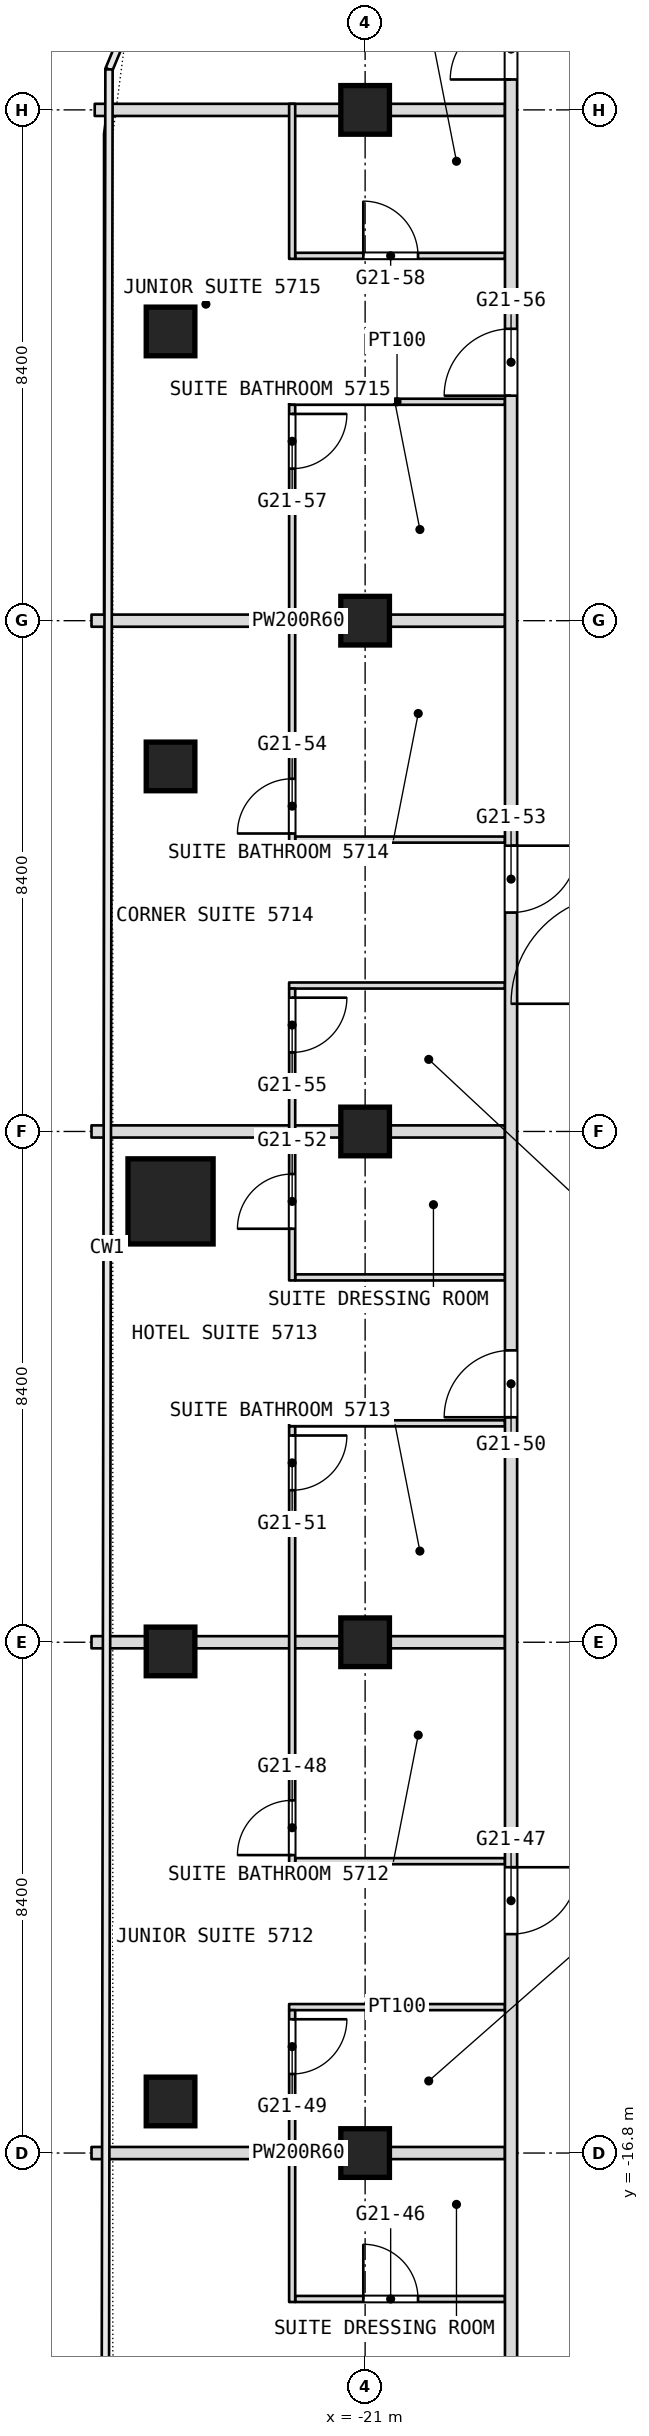
"""IFC4 building model, lengths in metres.
Left out: names, types, materials, properties, quantities, classifications, styles, units other than length and angle.
Written with IfcOpenShell. Run it as: python <this file> out.ifc"""

import sys

from ifc_helpers import new_model, si_unit, direction, frame, frame_2d, origin, origin_2d, place, context, subcontext, project, spatial, rectangle, extrude, element, fill, save


model = new_model("IFC4")
c1 = context("Model", 3, precision=1e-05, world=origin(), true_north=direction((0.0, 1.0)))
c2 = subcontext(c1, "Body", "Model", "MODEL_VIEW")
j1 = project(units=[si_unit("LENGTHUNIT", "METRE"), si_unit("PLANEANGLEUNIT", "RADIAN")], contexts=[c1])
p1 = place(None, origin())
s1 = spatial("IfcSite", under=j1, at=p1, CompositionType="ELEMENT")
p2 = place(p1, origin())
s2 = spatial("IfcBuilding", under=s1, at=p2, CompositionType="ELEMENT")
p3 = place(p2, frame((0.0, 0.0, 241.7)))
s3 = spatial("IfcBuildingStorey", under=s2, at=p3, CompositionType="ELEMENT", Elevation=241.7)
p4 = place(p3, frame((-24.2, -1.15, 0.0), z_axis=(0.0, 0.0, 1.0), x_axis=(1.0, 0.0, 0.0)))
e1 = element("IfcColumn", 1, at=p4, inside=s3, PredefinedType="COLUMN", context=c2, shape_type="SweptSolid", body=[
    extrude(rectangle(XDim=1.4, YDim=1.4, at=origin_2d()), origin(), (0.0, 0.0, 1.0), 3.6),
])
for number, where, z_axis, x_axis in (
    (2, (-21.0, -16.8, 0.0), (0.0, 0.0, 1.0), (1.0, 0.0, 0.0)),
    (3, (-21.0, -8.4, 0.0), (0.0, 0.0, 1.0), (1.0, 0.0, 0.0)),
    (4, (-21.0, 0.0, 0.0), (0.0, 0.0, 1.0), (1.0, 0.0, 0.0)),
    (5, (-21.0, 8.4, 0.0), (0.0, 0.0, 1.0), (1.0, 0.0, 0.0)),
    (6, (-21.0, 16.8, 0.0), (0.0, 0.0, 1.0), (1.0, 0.0, 0.0)),
    (7, (-24.2, -15.952, 0.0), (0.0, 0.0, 1.0), (1.0, 0.0, 0.0)),
    (8, (-24.2, -8.551, 0.0), (0.0, 0.0, 1.0), (1.0, 0.0, 0.0)),
    (9, (-24.2, 6.003, 0.0), (0.0, 0.0, 1.0), (1.0, 0.0, 0.0)),
    (10, (-24.2, 13.156, 0.0), (0.0, 0.0, 1.0), (1.0, 0.0, 0.0)),
):
    element("IfcColumn", number, at=place(p3, frame(where, z_axis=z_axis, x_axis=x_axis)), inside=s3, PredefinedType="COLUMN", context=c2, shape_type="SweptSolid", body=[
        extrude(rectangle(XDim=0.8, YDim=0.8, at=origin_2d()), origin(), (0.0, 0.0, 1.0), 3.6),
    ])
p5 = place(p3, frame((-22.15, -19.2, 0.0), z_axis=(0.0, 0.0, 1.0), x_axis=(1.0, 0.0, 0.0)))
e11 = element("IfcWall", 11, at=p5, inside=s3, PredefinedType="PARTITIONING", context=c2, shape_type="SweptSolid", body=[
    extrude(rectangle(XDim=3.45, YDim=0.1, at=frame_2d((1.725, 0.0))), origin(), (0.0, 0.0, 1.0), 3.34),
])
p6 = place(p5, frame((1.12, 0.0, 0.0)))
e12 = element("IfcOpeningElement", 12, at=p6, cuts=e11, PredefinedType="OPENING", context=c2, shape_type="SweptSolid", body=[
    extrude(rectangle(XDim=0.9, YDim=2.1, at=frame_2d((0.45, 1.05))), frame((0.0, 0.05, 0.0), z_axis=(0.0, -1.0, 0.0), x_axis=(1.0, 0.0, 0.0)), (0.0, 0.0, 1.0), 0.1),
])
p7 = place(p3, frame((-25.5, -16.8, 0.0), z_axis=(0.0, 0.0, 1.0), x_axis=(1.0, 0.0, 0.0)))
e13 = element("IfcWall", 13, at=p7, inside=s3, PredefinedType="PARTITIONING", context=c2, shape_type="SweptSolid", body=[
    extrude(rectangle(XDim=6.8, YDim=0.2, at=frame_2d((3.4, 0.0))), origin(), (0.0, 0.0, 1.0), 2.94),
])
p8 = place(p3, frame((-22.25, -14.4, 0.0), z_axis=(0.0, 0.0, 1.0), x_axis=(1.0, 0.0, 0.0)))
e14 = element("IfcWall", 14, at=p8, inside=s3, PredefinedType="PARTITIONING", context=c2, shape_type="SweptSolid", body=[
    extrude(rectangle(XDim=3.55, YDim=0.1, at=frame_2d((1.775, 0.0))), origin(), (0.0, 0.0, 1.0), 3.34),
])
p9 = place(p3, frame((-22.15, -12.0, 0.0), z_axis=(0.0, 0.0, 1.0), x_axis=(1.0, 0.0, 0.0)))
e15 = element("IfcWall", 15, at=p9, inside=s3, PredefinedType="PARTITIONING", context=c2, shape_type="SweptSolid", body=[
    extrude(rectangle(XDim=3.45, YDim=0.1, at=frame_2d((1.725, 0.0))), origin(), (0.0, 0.0, 1.0), 3.34),
])
p10 = place(p3, frame((-25.5, -8.4, 0.0), z_axis=(0.0, 0.0, 1.0), x_axis=(1.0, 0.0, 0.0)))
e16 = element("IfcWall", 16, at=p10, inside=s3, PredefinedType="PARTITIONING", context=c2, shape_type="SweptSolid", body=[
    extrude(rectangle(XDim=6.8, YDim=0.2, at=frame_2d((3.4, 0.0))), origin(), (0.0, 0.0, 1.0), 2.94),
])
p11 = place(p3, frame((-22.25, -4.8, 0.0), z_axis=(0.0, 0.0, 1.0), x_axis=(1.0, 0.0, 0.0)))
e17 = element("IfcWall", 17, at=p11, inside=s3, PredefinedType="PARTITIONING", context=c2, shape_type="SweptSolid", body=[
    extrude(rectangle(XDim=3.55, YDim=0.1, at=frame_2d((1.775, 0.0))), origin(), (0.0, 0.0, 1.0), 3.34),
])
p12 = place(p3, frame((-22.15, -2.4, 0.0), z_axis=(0.0, 0.0, 1.0), x_axis=(1.0, 0.0, 0.0)))
e18 = element("IfcWall", 18, at=p12, inside=s3, PredefinedType="PARTITIONING", context=c2, shape_type="SweptSolid", body=[
    extrude(rectangle(XDim=3.45, YDim=0.1, at=frame_2d((1.725, 0.0))), origin(), (0.0, 0.0, 1.0), 3.34),
])
p13 = place(p3, frame((-25.5, 0.0, 0.0), z_axis=(0.0, 0.0, 1.0), x_axis=(1.0, 0.0, 0.0)))
e19 = element("IfcWall", 19, at=p13, inside=s3, PredefinedType="PARTITIONING", context=c2, shape_type="SweptSolid", body=[
    extrude(rectangle(XDim=6.8, YDim=0.2, at=frame_2d((3.4, 0.0))), origin(), (0.0, 0.0, 1.0), 2.94),
])
p14 = place(p3, frame((-22.25, 2.4, 0.0), z_axis=(0.0, 0.0, 1.0), x_axis=(1.0, 0.0, 0.0)))
e20 = element("IfcWall", 20, at=p14, inside=s3, PredefinedType="PARTITIONING", context=c2, shape_type="SweptSolid", body=[
    extrude(rectangle(XDim=3.55, YDim=0.1, at=frame_2d((1.775, 0.0))), origin(), (0.0, 0.0, 1.0), 3.34),
])
p15 = place(p3, frame((-22.15, 4.8, 0.0), z_axis=(0.0, 0.0, 1.0), x_axis=(1.0, 0.0, 0.0)))
e21 = element("IfcWall", 21, at=p15, inside=s3, PredefinedType="PARTITIONING", context=c2, shape_type="SweptSolid", body=[
    extrude(rectangle(XDim=3.45, YDim=0.1, at=frame_2d((1.725, 0.0))), origin(), (0.0, 0.0, 1.0), 3.34),
])
p16 = place(p3, frame((-25.5, 8.4, 0.0), z_axis=(0.0, 0.0, 1.0), x_axis=(1.0, 0.0, 0.0)))
e22 = element("IfcWall", 22, at=p16, inside=s3, PredefinedType="PARTITIONING", context=c2, shape_type="SweptSolid", body=[
    extrude(rectangle(XDim=6.8, YDim=0.2, at=frame_2d((3.4, 0.0))), origin(), (0.0, 0.0, 1.0), 2.94),
])
p17 = place(p3, frame((-22.25, 12.0, 0.0), z_axis=(0.0, 0.0, 1.0), x_axis=(1.0, 0.0, 0.0)))
e23 = element("IfcWall", 23, at=p17, inside=s3, PredefinedType="PARTITIONING", context=c2, shape_type="SweptSolid", body=[
    extrude(rectangle(XDim=3.55, YDim=0.1, at=frame_2d((1.775, 0.0))), origin(), (0.0, 0.0, 1.0), 3.34),
])
p18 = place(p3, frame((-22.15, 14.4, 0.0), z_axis=(0.0, 0.0, 1.0), x_axis=(1.0, 0.0, 0.0)))
e24 = element("IfcWall", 24, at=p18, inside=s3, PredefinedType="PARTITIONING", context=c2, shape_type="SweptSolid", body=[
    extrude(rectangle(XDim=3.45, YDim=0.1, at=frame_2d((1.725, 0.0))), origin(), (0.0, 0.0, 1.0), 3.34),
])
p19 = place(p18, frame((1.12, 0.0, 0.0)))
e25 = element("IfcOpeningElement", 25, at=p19, cuts=e24, PredefinedType="OPENING", context=c2, shape_type="SweptSolid", body=[
    extrude(rectangle(XDim=0.9, YDim=2.1, at=frame_2d((0.45, 1.05))), frame((0.0, 0.05, 0.0), z_axis=(0.0, -1.0, 0.0), x_axis=(1.0, 0.0, 0.0)), (0.0, 0.0, 1.0), 0.1),
])
p20 = place(p3, frame((-25.447, 16.8, 0.0), z_axis=(0.0, 0.0, 1.0), x_axis=(1.0, 0.0, 0.0)))
e26 = element("IfcWall", 26, at=p20, inside=s3, PredefinedType="PARTITIONING", context=c2, shape_type="SweptSolid", body=[
    extrude(rectangle(XDim=6.747, YDim=0.2, at=frame_2d((3.374, 0.0))), origin(), (0.0, 0.0, 1.0), 2.94),
])
p21 = place(p3, frame((-18.6, -26.751, 0.0), z_axis=(0.0, 0.0, 1.0), x_axis=(0.0, 1.0, 0.0)))
e27 = element("IfcWall", 27, at=p21, inside=s3, PredefinedType="PARTITIONING", context=c2, shape_type="SweptSolid", body=[
    extrude(rectangle(XDim=49.091, YDim=0.2, at=frame_2d((24.545, 0.0))), origin(), (0.0, 0.0, 1.0), 3.34),
])
p22 = place(p21, frame((4.576, 0.0, 0.0)))
e28 = element("IfcOpeningElement", 28, at=p22, cuts=e27, PredefinedType="OPENING", context=c2, shape_type="SweptSolid", body=[
    extrude(rectangle(XDim=1.1, YDim=2.1, at=frame_2d((0.55, 1.05))), frame((0.0, 0.1, 0.0), z_axis=(0.0, -1.0, 0.0), x_axis=(1.0, 0.0, 0.0)), (0.0, 0.0, 1.0), 0.2),
])
p23 = place(p21, frame((13.551, 0.0, 0.0)))
e29 = element("IfcOpeningElement", 29, at=p23, cuts=e27, PredefinedType="OPENING", context=c2, shape_type="SweptSolid", body=[
    extrude(rectangle(XDim=1.1, YDim=2.1, at=frame_2d((0.55, 1.05))), frame((0.0, 0.1, 0.0), z_axis=(0.0, -1.0, 0.0), x_axis=(1.0, 0.0, 0.0)), (0.0, 0.0, 1.0), 0.2),
])
p24 = place(p21, frame((22.051, 0.0, 0.0)))
e30 = element("IfcOpeningElement", 30, at=p24, cuts=e27, PredefinedType="OPENING", context=c2, shape_type="SweptSolid", body=[
    extrude(rectangle(XDim=1.1, YDim=2.1, at=frame_2d((0.55, 1.05))), frame((0.0, 0.1, 0.0), z_axis=(0.0, -1.0, 0.0), x_axis=(1.0, 0.0, 0.0)), (0.0, 0.0, 1.0), 0.2),
])
p25 = place(p21, frame((30.351, 0.0, 0.0)))
e31 = element("IfcOpeningElement", 31, at=p25, cuts=e27, PredefinedType="OPENING", context=c2, shape_type="SweptSolid", body=[
    extrude(rectangle(XDim=1.1, YDim=2.1, at=frame_2d((0.55, 1.05))), frame((0.0, 0.1, 0.0), z_axis=(0.0, -1.0, 0.0), x_axis=(1.0, 0.0, 0.0)), (0.0, 0.0, 1.0), 0.2),
])
p26 = place(p21, frame((38.851, 0.0, 0.0)))
e32 = element("IfcOpeningElement", 32, at=p26, cuts=e27, PredefinedType="OPENING", context=c2, shape_type="SweptSolid", body=[
    extrude(rectangle(XDim=1.1, YDim=2.1, at=frame_2d((0.55, 1.05))), frame((0.0, 0.1, 0.0), z_axis=(0.0, -1.0, 0.0), x_axis=(1.0, 0.0, 0.0)), (0.0, 0.0, 1.0), 0.2),
])
p27 = place(p21, frame((44.051, 0.0, 0.0)))
e33 = element("IfcOpeningElement", 33, at=p27, cuts=e27, PredefinedType="OPENING", context=c2, shape_type="SweptSolid", body=[
    extrude(rectangle(XDim=1.0, YDim=2.1, at=frame_2d((0.5, 1.05))), frame((0.0, 0.1, 0.0), z_axis=(0.0, -1.0, 0.0), x_axis=(1.0, 0.0, 0.0)), (0.0, 0.0, 1.0), 0.2),
])
p28 = place(p3, frame((-22.2, -19.25, 0.0), z_axis=(0.0, 0.0, 1.0), x_axis=(0.0, 1.0, 0.0)))
e34 = element("IfcWall", 34, at=p28, inside=s3, PredefinedType="PARTITIONING", context=c2, shape_type="SweptSolid", body=[
    extrude(rectangle(XDim=4.8, YDim=0.1, at=frame_2d((2.4, 0.0))), origin(), (0.0, 0.0, 1.0), 3.34),
])
p29 = place(p28, frame((3.75, 0.0, 0.0)))
e35 = element("IfcOpeningElement", 35, at=p29, cuts=e34, PredefinedType="OPENING", context=c2, shape_type="SweptSolid", body=[
    extrude(rectangle(XDim=0.9, YDim=2.1, at=frame_2d((0.45, 1.05))), frame((0.0, 0.05, 0.0), z_axis=(0.0, -1.0, 0.0), x_axis=(1.0, 0.0, 0.0)), (0.0, 0.0, 1.0), 0.1),
])
p30 = place(p3, frame((-22.2, -12.05, 0.0), z_axis=(0.0, 0.0, 1.0), x_axis=(0.0, 1.0, 0.0)))
e36 = element("IfcWall", 36, at=p30, inside=s3, PredefinedType="PARTITIONING", context=c2, shape_type="SweptSolid", body=[
    extrude(rectangle(XDim=7.2, YDim=0.1, at=frame_2d((3.6, 0.0))), origin(), (0.0, 0.0, 1.0), 3.34),
])
p31 = place(p30, frame((0.15, 0.0, 0.0)))
e37 = element("IfcOpeningElement", 37, at=p31, cuts=e36, PredefinedType="OPENING", context=c2, shape_type="SweptSolid", body=[
    extrude(rectangle(XDim=0.9, YDim=2.1, at=frame_2d((0.45, 1.05))), frame((0.0, 0.05, 0.0), z_axis=(0.0, -1.0, 0.0), x_axis=(1.0, 0.0, 0.0)), (0.0, 0.0, 1.0), 0.1),
])
p32 = place(p30, frame((6.15, 0.0, 0.0)))
e38 = element("IfcOpeningElement", 38, at=p32, cuts=e36, PredefinedType="OPENING", context=c2, shape_type="SweptSolid", body=[
    extrude(rectangle(XDim=0.9, YDim=2.1, at=frame_2d((0.45, 1.05))), frame((0.0, 0.05, 0.0), z_axis=(0.0, -1.0, 0.0), x_axis=(1.0, 0.0, 0.0)), (0.0, 0.0, 1.0), 0.1),
])
p33 = place(p3, frame((-22.2, -2.45, 0.0), z_axis=(0.0, 0.0, 1.0), x_axis=(0.0, 1.0, 0.0)))
e39 = element("IfcWall", 39, at=p33, inside=s3, PredefinedType="PARTITIONING", context=c2, shape_type="SweptSolid", body=[
    extrude(rectangle(XDim=4.8, YDim=0.1, at=frame_2d((2.4, 0.0))), origin(), (0.0, 0.0, 1.0), 3.34),
])
p34 = place(p33, frame((0.85, 0.0, 0.0)))
e40 = element("IfcOpeningElement", 40, at=p34, cuts=e39, PredefinedType="OPENING", context=c2, shape_type="SweptSolid", body=[
    extrude(rectangle(XDim=0.9, YDim=2.1, at=frame_2d((0.45, 1.05))), frame((0.0, 0.05, 0.0), z_axis=(0.0, -1.0, 0.0), x_axis=(1.0, 0.0, 0.0)), (0.0, 0.0, 1.0), 0.1),
])
p35 = place(p33, frame((3.75, 0.0, 0.0)))
e41 = element("IfcOpeningElement", 41, at=p35, cuts=e39, PredefinedType="OPENING", context=c2, shape_type="SweptSolid", body=[
    extrude(rectangle(XDim=0.9, YDim=2.1, at=frame_2d((0.45, 1.05))), frame((0.0, 0.05, 0.0), z_axis=(0.0, -1.0, 0.0), x_axis=(1.0, 0.0, 0.0)), (0.0, 0.0, 1.0), 0.1),
])
p36 = place(p3, frame((-22.2, 4.75, 0.0), z_axis=(0.0, 0.0, 1.0), x_axis=(0.0, 1.0, 0.0)))
e42 = element("IfcWall", 42, at=p36, inside=s3, PredefinedType="PARTITIONING", context=c2, shape_type="SweptSolid", body=[
    extrude(rectangle(XDim=7.2, YDim=0.1, at=frame_2d((3.6, 0.0))), origin(), (0.0, 0.0, 1.0), 3.34),
])
p37 = place(p36, frame((0.15, 0.0, 0.0)))
e43 = element("IfcOpeningElement", 43, at=p37, cuts=e42, PredefinedType="OPENING", context=c2, shape_type="SweptSolid", body=[
    extrude(rectangle(XDim=0.9, YDim=2.1, at=frame_2d((0.45, 1.05))), frame((0.0, 0.05, 0.0), z_axis=(0.0, -1.0, 0.0), x_axis=(1.0, 0.0, 0.0)), (0.0, 0.0, 1.0), 0.1),
])
p38 = place(p36, frame((6.15, 0.0, 0.0)))
e44 = element("IfcOpeningElement", 44, at=p38, cuts=e42, PredefinedType="OPENING", context=c2, shape_type="SweptSolid", body=[
    extrude(rectangle(XDim=0.9, YDim=2.1, at=frame_2d((0.45, 1.05))), frame((0.0, 0.05, 0.0), z_axis=(0.0, -1.0, 0.0), x_axis=(1.0, 0.0, 0.0)), (0.0, 0.0, 1.0), 0.1),
])
p39 = place(p3, frame((-22.2, 14.35, 0.0), z_axis=(0.0, 0.0, 1.0), x_axis=(0.0, 1.0, 0.0)))
e45 = element("IfcWall", 45, at=p39, inside=s3, PredefinedType="PARTITIONING", context=c2, shape_type="SweptSolid", body=[
    extrude(rectangle(XDim=2.55, YDim=0.1, at=frame_2d((1.275, 0.0))), origin(), (0.0, 0.0, 1.0), 3.34),
])
p40 = place(p6, origin())
e46 = element("IfcDoor", 46, at=p40, inside=s3, OperationType="SINGLE_SWING_LEFT", PredefinedType="DOOR", context=c2, shape_type="SweptSolid", body=[
    extrude(rectangle(XDim=0.9, YDim=2.1, at=frame_2d((0.45, 1.05))), frame((0.0, 0.025, 0.0), z_axis=(0.0, -1.0, 0.0), x_axis=(1.0, 0.0, 0.0)), (0.0, 0.0, 1.0), 0.05),
])
fill(e12, e46)
p41 = place(p19, origin())
e47 = element("IfcDoor", 47, at=p41, inside=s3, OperationType="SINGLE_SWING_LEFT", PredefinedType="DOOR", context=c2, shape_type="SweptSolid", body=[
    extrude(rectangle(XDim=0.9, YDim=2.1, at=frame_2d((0.45, 1.05))), frame((0.0, 0.025, 0.0), z_axis=(0.0, -1.0, 0.0), x_axis=(1.0, 0.0, 0.0)), (0.0, 0.0, 1.0), 0.05),
])
fill(e25, e47)
p42 = place(p23, origin())
e48 = element("IfcDoor", 48, at=p42, inside=s3, OperationType="SINGLE_SWING_RIGHT", PredefinedType="DOOR", context=c2, shape_type="SweptSolid", body=[
    extrude(rectangle(XDim=1.1, YDim=2.1, at=frame_2d((0.55, 1.05))), frame((0.0, 0.025, 0.0), z_axis=(0.0, -1.0, 0.0), x_axis=(1.0, 0.0, 0.0)), (0.0, 0.0, 1.0), 0.05),
])
fill(e29, e48)
p43 = place(p24, origin())
e49 = element("IfcDoor", 49, at=p43, inside=s3, OperationType="SINGLE_SWING_LEFT", PredefinedType="DOOR", context=c2, shape_type="SweptSolid", body=[
    extrude(rectangle(XDim=1.1, YDim=2.1, at=frame_2d((0.55, 1.05))), frame((0.0, 0.025, 0.0), z_axis=(0.0, -1.0, 0.0), x_axis=(1.0, 0.0, 0.0)), (0.0, 0.0, 1.0), 0.05),
])
fill(e30, e49)
p44 = place(p25, origin())
e50 = element("IfcDoor", 50, at=p44, inside=s3, OperationType="SINGLE_SWING_RIGHT", PredefinedType="DOOR", context=c2, shape_type="SweptSolid", body=[
    extrude(rectangle(XDim=1.1, YDim=2.1, at=frame_2d((0.55, 1.05))), frame((0.0, 0.025, 0.0), z_axis=(0.0, -1.0, 0.0), x_axis=(1.0, 0.0, 0.0)), (0.0, 0.0, 1.0), 0.05),
])
fill(e31, e50)
p45 = place(p26, origin())
e51 = element("IfcDoor", 51, at=p45, inside=s3, OperationType="SINGLE_SWING_LEFT", PredefinedType="DOOR", context=c2, shape_type="SweptSolid", body=[
    extrude(rectangle(XDim=1.1, YDim=2.1, at=frame_2d((0.55, 1.05))), frame((0.0, 0.025, 0.0), z_axis=(0.0, -1.0, 0.0), x_axis=(1.0, 0.0, 0.0)), (0.0, 0.0, 1.0), 0.05),
])
fill(e32, e51)
p46 = place(p27, origin())
e52 = element("IfcDoor", 52, at=p46, inside=s3, OperationType="SINGLE_SWING_RIGHT", PredefinedType="DOOR", context=c2, shape_type="SweptSolid", body=[
    extrude(rectangle(XDim=1.0, YDim=2.1, at=frame_2d((0.5, 1.05))), frame((0.0, 0.025, 0.0), z_axis=(0.0, -1.0, 0.0), x_axis=(1.0, 0.0, 0.0)), (0.0, 0.0, 1.0), 0.05),
])
fill(e33, e52)
p47 = place(p29, origin())
e53 = element("IfcDoor", 53, at=p47, inside=s3, OperationType="SINGLE_SWING_LEFT", PredefinedType="DOOR", context=c2, shape_type="SweptSolid", body=[
    extrude(rectangle(XDim=0.9, YDim=2.1, at=frame_2d((0.45, 1.05))), frame((0.0, 0.025, 0.0), z_axis=(0.0, -1.0, 0.0), x_axis=(1.0, 0.0, 0.0)), (0.0, 0.0, 1.0), 0.05),
])
fill(e35, e53)
p48 = place(p31, origin())
e54 = element("IfcDoor", 54, at=p48, inside=s3, OperationType="SINGLE_SWING_RIGHT", PredefinedType="DOOR", context=c2, shape_type="SweptSolid", body=[
    extrude(rectangle(XDim=0.9, YDim=2.1, at=frame_2d((0.45, 1.05))), frame((0.0, 0.025, 0.0), z_axis=(0.0, -1.0, 0.0), x_axis=(1.0, 0.0, 0.0)), (0.0, 0.0, 1.0), 0.05),
])
fill(e37, e54)
p49 = place(p32, origin())
e55 = element("IfcDoor", 55, at=p49, inside=s3, OperationType="SINGLE_SWING_LEFT", PredefinedType="DOOR", context=c2, shape_type="SweptSolid", body=[
    extrude(rectangle(XDim=0.9, YDim=2.1, at=frame_2d((0.45, 1.05))), frame((0.0, 0.025, 0.0), z_axis=(0.0, -1.0, 0.0), x_axis=(1.0, 0.0, 0.0)), (0.0, 0.0, 1.0), 0.05),
])
fill(e38, e55)
p50 = place(p34, origin())
e56 = element("IfcDoor", 56, at=p50, inside=s3, OperationType="SINGLE_SWING_LEFT", PredefinedType="DOOR", context=c2, shape_type="SweptSolid", body=[
    extrude(rectangle(XDim=0.9, YDim=2.1, at=frame_2d((0.45, 1.05))), frame((0.0, 0.025, 0.0), z_axis=(0.0, -1.0, 0.0), x_axis=(1.0, 0.0, 0.0)), (0.0, 0.0, 1.0), 0.05),
])
fill(e40, e56)
p51 = place(p35, origin())
e57 = element("IfcDoor", 57, at=p51, inside=s3, OperationType="SINGLE_SWING_LEFT", PredefinedType="DOOR", context=c2, shape_type="SweptSolid", body=[
    extrude(rectangle(XDim=0.9, YDim=2.1, at=frame_2d((0.45, 1.05))), frame((0.0, 0.025, 0.0), z_axis=(0.0, -1.0, 0.0), x_axis=(1.0, 0.0, 0.0)), (0.0, 0.0, 1.0), 0.05),
])
fill(e41, e57)
p52 = place(p37, origin())
e58 = element("IfcDoor", 58, at=p52, inside=s3, OperationType="SINGLE_SWING_RIGHT", PredefinedType="DOOR", context=c2, shape_type="SweptSolid", body=[
    extrude(rectangle(XDim=0.9, YDim=2.1, at=frame_2d((0.45, 1.05))), frame((0.0, 0.025, 0.0), z_axis=(0.0, -1.0, 0.0), x_axis=(1.0, 0.0, 0.0)), (0.0, 0.0, 1.0), 0.05),
])
fill(e43, e58)
p53 = place(p38, origin())
e59 = element("IfcDoor", 59, at=p53, inside=s3, OperationType="SINGLE_SWING_LEFT", PredefinedType="DOOR", context=c2, shape_type="SweptSolid", body=[
    extrude(rectangle(XDim=0.9, YDim=2.1, at=frame_2d((0.45, 1.05))), frame((0.0, 0.025, 0.0), z_axis=(0.0, -1.0, 0.0), x_axis=(1.0, 0.0, 0.0)), (0.0, 0.0, 1.0), 0.05),
])
fill(e44, e59)
save(model, sys.argv[1])
